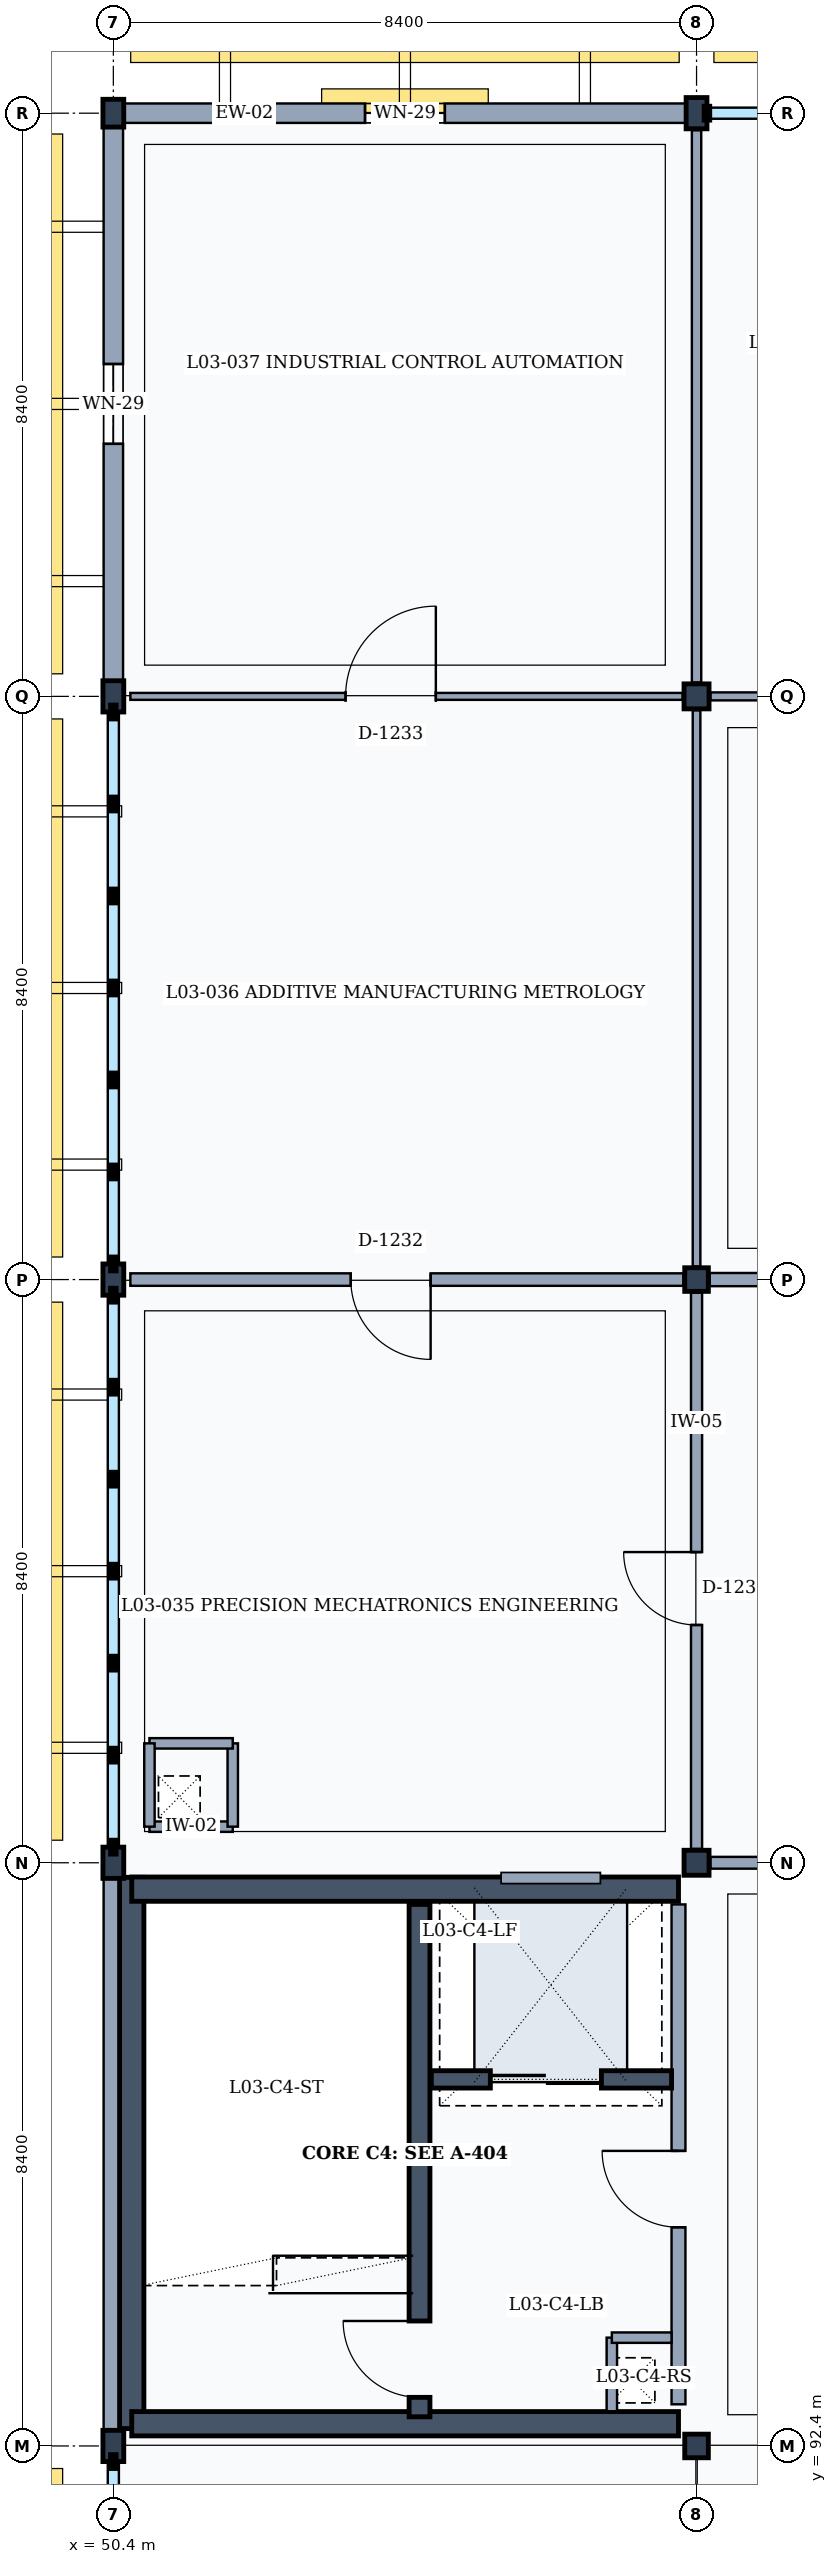
"""IFC4 building model, lengths in metres.
Left out: names, types, materials, properties, quantities, classifications, styles, units other than length and angle.
Written with IfcOpenShell. Run it as: python <this file> out.ifc"""

import sys

from ifc_helpers import new_model, si_unit, direction, frame, frame_2d, origin, origin_2d, place, context, subcontext, project, spatial, rectangle, i_section, extrude, element, fill, save


model = new_model("IFC4")
c1 = context("Model", 3, precision=1e-05, world=origin(), true_north=direction((0.0, 1.0)))
c2 = subcontext(c1, "Body", "Model", "MODEL_VIEW")
j1 = project(units=[si_unit("LENGTHUNIT", "METRE"), si_unit("PLANEANGLEUNIT", "RADIAN")], contexts=[c1])
p1 = place(None, origin())
s1 = spatial("IfcSite", under=j1, at=p1, CompositionType="ELEMENT")
p2 = place(p1, origin())
s2 = spatial("IfcBuilding", under=s1, at=p2, CompositionType="ELEMENT")
p3 = place(p2, frame((0.0, 0.0, 13.8)))
s3 = spatial("IfcBuildingStorey", under=s2, at=p3, CompositionType="ELEMENT", Elevation=13.8)
for number, where, z_axis, x_axis in (
    (1, (50.4, 92.4, 0.0), (0.0, 0.0, 1.0), (1.0, 0.0, 0.0)),
    (2, (50.4, 100.8, 0.0), (0.0, 0.0, 1.0), (1.0, 0.0, 0.0)),
    (3, (50.4, 109.2, 0.0), (0.0, 0.0, 1.0), (1.0, 0.0, 0.0)),
    (4, (50.4, 117.6, 0.0), (0.0, 0.0, 1.0), (1.0, 0.0, 0.0)),
):
    element("IfcColumn", number, at=place(p3, frame(where, z_axis=z_axis, x_axis=x_axis)), inside=s3, PredefinedType="COLUMN", context=c2, shape_type="SweptSolid", body=[
        extrude(i_section(OverallWidth=0.3, OverallDepth=0.45, WebThickness=0.014, FlangeThickness=0.026, FilletRadius=0.027, at=origin_2d()), origin(), (0.0, 0.0, 1.0), 4.2),
    ])
p4 = place(p3, frame((50.4, 126.0, 0.0), z_axis=(0.0, 0.0, 1.0), x_axis=(1.0, 0.0, 0.0)))
e5 = element("IfcColumn", 5, at=p4, inside=s3, PredefinedType="COLUMN", context=c2, shape_type="SweptSolid", body=[
    extrude(i_section(OverallWidth=0.3, OverallDepth=0.4, WebThickness=0.013, FlangeThickness=0.024, FilletRadius=0.027, at=origin_2d()), origin(), (0.0, 0.0, 1.0), 4.2),
])
p5 = place(p3, frame((58.8, 92.4, 0.0), z_axis=(0.0, 0.0, 1.0), x_axis=(1.0, 0.0, 0.0)))
e6 = element("IfcColumn", 6, at=p5, inside=s3, PredefinedType="COLUMN", context=c2, shape_type="SweptSolid", body=[
    extrude(rectangle(XDim=0.34, YDim=0.34, at=origin_2d()), origin(), (0.0, 0.0, 1.0), 4.2),
])
p6 = place(p3, frame((58.8, 100.8, 0.0), z_axis=(0.0, 0.0, 1.0), x_axis=(1.0, 0.0, 0.0)))
e7 = element("IfcColumn", 7, at=p6, inside=s3, PredefinedType="COLUMN", context=c2, shape_type="SweptSolid", body=[
    extrude(rectangle(XDim=0.36, YDim=0.36, at=origin_2d()), origin(), (0.0, 0.0, 1.0), 4.2),
])
p7 = place(p3, frame((58.8, 109.2, 0.0), z_axis=(0.0, 0.0, 1.0), x_axis=(1.0, 0.0, 0.0)))
e8 = element("IfcColumn", 8, at=p7, inside=s3, PredefinedType="COLUMN", context=c2, shape_type="SweptSolid", body=[
    extrude(rectangle(XDim=0.34, YDim=0.34, at=origin_2d()), origin(), (0.0, 0.0, 1.0), 4.2),
])
p8 = place(p3, frame((58.8, 117.6, 0.0), z_axis=(0.0, 0.0, 1.0), x_axis=(1.0, 0.0, 0.0)))
e9 = element("IfcColumn", 9, at=p8, inside=s3, PredefinedType="COLUMN", context=c2, shape_type="SweptSolid", body=[
    extrude(rectangle(XDim=0.36, YDim=0.36, at=origin_2d()), origin(), (0.0, 0.0, 1.0), 4.2),
])
p9 = place(p3, frame((58.8, 126.0, 0.0), z_axis=(0.0, 0.0, 1.0), x_axis=(1.0, 0.0, 0.0)))
e10 = element("IfcColumn", 10, at=p9, inside=s3, PredefinedType="COLUMN", context=c2, shape_type="SweptSolid", body=[
    extrude(i_section(OverallWidth=0.3, OverallDepth=0.45, WebThickness=0.014, FlangeThickness=0.026, FilletRadius=0.027, at=origin_2d()), origin(), (0.0, 0.0, 1.0), 4.2),
])
p10 = place(p3, frame((50.4, 92.625, 0.0), z_axis=(0.0, 0.0, 1.0), x_axis=(0.0, 1.0, 0.0)))
e11 = element("IfcWall", 11, at=p10, inside=s3, PredefinedType="SOLIDWALL", context=c2, shape_type="SweptSolid", body=[
    extrude(rectangle(XDim=7.95, YDim=0.28, at=frame_2d((3.975, 0.0))), origin(), (0.0, 0.0, 1.0), 3.36),
])
p11 = place(p3, frame((50.55, 126.0, 0.0), z_axis=(0.0, 0.0, 1.0), x_axis=(1.0, 0.0, 0.0)))
e12 = element("IfcWall", 12, at=p11, inside=s3, PredefinedType="SOLIDWALL", context=c2, shape_type="SweptSolid", body=[
    extrude(rectangle(XDim=8.1, YDim=0.28, at=frame_2d((4.05, 0.0))), origin(), (0.0, 0.0, 1.0), 3.36),
])
p12 = place(p11, frame((3.475, 0.0, 0.9)))
e13 = element("IfcOpeningElement", 13, at=p12, cuts=e12, PredefinedType="OPENING", context=c2, shape_type="SweptSolid", body=[
    extrude(rectangle(XDim=1.15, YDim=1.65, at=frame_2d((0.575, 0.825))), frame((0.0, 0.15, 0.0), z_axis=(0.0, -1.0, 0.0), x_axis=(1.0, 0.0, 0.0)), (0.0, 0.0, 1.0), 0.3),
])
p13 = place(p3, frame((50.4, 117.825, 0.0), z_axis=(0.0, 0.0, 1.0), x_axis=(0.0, 1.0, 0.0)))
e14 = element("IfcWall", 14, at=p13, inside=s3, PredefinedType="SOLIDWALL", context=c2, shape_type="SweptSolid", body=[
    extrude(rectangle(XDim=7.975, YDim=0.28, at=frame_2d((3.988, 0.0))), origin(), (0.0, 0.0, 1.0), 3.36),
])
p14 = place(p13, frame((3.413, 0.0, 0.9)))
e15 = element("IfcOpeningElement", 15, at=p14, cuts=e14, PredefinedType="OPENING", context=c2, shape_type="SweptSolid", body=[
    extrude(rectangle(XDim=1.15, YDim=1.65, at=frame_2d((0.575, 0.825))), frame((0.0, 0.15, 0.0), z_axis=(0.0, -1.0, 0.0), x_axis=(1.0, 0.0, 0.0)), (0.0, 0.0, 1.0), 0.3),
])
p15 = place(p3, frame((50.665, 92.65, 0.0), z_axis=(0.0, 0.0, 1.0), x_axis=(0.0, 1.0, 0.0)))
e16 = element("IfcWall", 16, at=p15, inside=s3, PredefinedType="SHEAR", context=c2, shape_type="SweptSolid", body=[
    extrude(rectangle(XDim=7.94, YDim=0.35, at=frame_2d((3.97, 0.0))), origin(), (0.0, 0.0, 1.0), 3.98),
])
p16 = place(p3, frame((50.665, 100.42, 0.0), z_axis=(0.0, 0.0, 1.0), x_axis=(1.0, 0.0, 0.0)))
e17 = element("IfcWall", 17, at=p16, inside=s3, PredefinedType="SHEAR", context=c2, shape_type="SweptSolid", body=[
    extrude(rectangle(XDim=7.875, YDim=0.35, at=frame_2d((3.938, 0.0))), origin(), (0.0, 0.0, 1.0), 3.98),
])
p17 = place(p3, frame((58.54, 100.2, 0.0), z_axis=(0.0, 0.0, 1.0), x_axis=(0.0, -1.0, 0.0)))
e18 = element("IfcWall", 18, at=p17, inside=s3, PredefinedType="PARTITIONING", context=c2, shape_type="SweptSolid", body=[
    extrude(rectangle(XDim=7.2, YDim=0.2, at=frame_2d((3.6, 0.0))), origin(), (0.0, 0.0, 1.0), 3.32),
])
p18 = place(p17, frame((3.55, 0.0, 0.0)))
e19 = element("IfcOpeningElement", 19, at=p18, cuts=e18, PredefinedType="OPENING", context=c2, shape_type="SweptSolid", body=[
    extrude(rectangle(XDim=1.1, YDim=2.15, at=frame_2d((0.55, 1.075))), frame((0.0, 0.11, 0.0), z_axis=(0.0, -1.0, 0.0), x_axis=(1.0, 0.0, 0.0)), (0.0, 0.0, 1.0), 0.22),
])
p19 = place(p3, frame((58.54, 92.72, 0.0), z_axis=(0.0, 0.0, 1.0), x_axis=(-1.0, 0.0, 0.0)))
e20 = element("IfcWall", 20, at=p19, inside=s3, PredefinedType="SHEAR", context=c2, shape_type="SweptSolid", body=[
    extrude(rectangle(XDim=7.875, YDim=0.35, at=frame_2d((3.938, 0.0))), origin(), (0.0, 0.0, 1.0), 3.98),
])
p20 = place(p3, frame((54.81, 92.82, 0.0), z_axis=(0.0, 0.0, 1.0), x_axis=(0.0, 1.0, 0.0)))
e21 = element("IfcWall", 21, at=p20, inside=s3, PredefinedType="SHEAR", context=c2, shape_type="SweptSolid", body=[
    extrude(rectangle(XDim=7.38, YDim=0.3, at=frame_2d((3.69, 0.0))), origin(), (0.0, 0.0, 1.0), 3.98),
])
p21 = place(p20, frame((0.28, 0.0, 0.0)))
e22 = element("IfcOpeningElement", 22, at=p21, cuts=e21, PredefinedType="OPENING", context=c2, shape_type="SweptSolid", body=[
    extrude(rectangle(XDim=1.1, YDim=2.15, at=frame_2d((0.55, 1.075))), frame((0.0, 0.16, 0.0), z_axis=(0.0, -1.0, 0.0), x_axis=(1.0, 0.0, 0.0)), (0.0, 0.0, 1.0), 0.32),
])
p22 = place(p3, frame((57.58, 93.96, 0.0), z_axis=(0.0, 0.0, 1.0), x_axis=(0.0, -1.0, 0.0)))
e23 = element("IfcWall", 23, at=p22, inside=s3, PredefinedType="PARTITIONING", context=c2, shape_type="SweptSolid", body=[
    extrude(rectangle(XDim=1.06, YDim=0.15, at=frame_2d((0.53, 0.0))), origin(), (0.0, 0.0, 1.0), 3.32),
])
p23 = place(p3, frame((57.58, 93.96, 0.0), z_axis=(0.0, 0.0, 1.0), x_axis=(1.0, 0.0, 0.0)))
e24 = element("IfcWall", 24, at=p23, inside=s3, PredefinedType="PARTITIONING", context=c2, shape_type="SweptSolid", body=[
    extrude(rectangle(XDim=0.86, YDim=0.15, at=frame_2d((0.43, 0.0))), origin(), (0.0, 0.0, 1.0), 3.32),
])
p24 = place(p3, frame((54.98, 97.68, 0.0), z_axis=(0.0, 0.0, 1.0), x_axis=(1.0, 0.0, 0.0)))
e25 = element("IfcWall", 25, at=p24, inside=s3, PredefinedType="SHEAR", context=c2, shape_type="SweptSolid", body=[
    extrude(rectangle(XDim=3.46, YDim=0.25, at=frame_2d((1.73, 0.0))), origin(), (0.0, 0.0, 1.0), 3.98),
])
p25 = place(p24, frame((0.85, 0.0, 0.0)))
e26 = element("IfcOpeningElement", 26, at=p25, cuts=e25, PredefinedType="OPENING", context=c2, shape_type="SweptSolid", body=[
    extrude(rectangle(XDim=1.6, YDim=2.3, at=frame_2d((0.8, 1.15))), frame((0.0, 0.135, 0.0), z_axis=(0.0, -1.0, 0.0), x_axis=(1.0, 0.0, 0.0)), (0.0, 0.0, 1.0), 0.27),
])
p26 = place(p3, frame((50.92, 101.32, 0.0), z_axis=(0.0, 0.0, 1.0), x_axis=(1.0, 0.0, 0.0)))
e27 = element("IfcWall", 27, at=p26, inside=s3, PredefinedType="PARTITIONING", context=c2, shape_type="SweptSolid", body=[
    extrude(rectangle(XDim=1.2, YDim=0.15, at=frame_2d((0.6, 0.0))), origin(), (0.0, 0.0, 1.0), 3.98),
])
p27 = place(p3, frame((52.12, 101.32, 0.0), z_axis=(0.0, 0.0, 1.0), x_axis=(0.0, 1.0, 0.0)))
e28 = element("IfcWall", 28, at=p27, inside=s3, PredefinedType="PARTITIONING", context=c2, shape_type="SweptSolid", body=[
    extrude(rectangle(XDim=1.2, YDim=0.15, at=frame_2d((0.6, 0.0))), origin(), (0.0, 0.0, 1.0), 3.98),
])
p28 = place(p3, frame((52.12, 102.52, 0.0), z_axis=(0.0, 0.0, 1.0), x_axis=(-1.0, 0.0, 0.0)))
e29 = element("IfcWall", 29, at=p28, inside=s3, PredefinedType="PARTITIONING", context=c2, shape_type="SweptSolid", body=[
    extrude(rectangle(XDim=1.2, YDim=0.15, at=frame_2d((0.6, 0.0))), origin(), (0.0, 0.0, 1.0), 3.98),
])
p29 = place(p3, frame((50.92, 102.52, 0.0), z_axis=(0.0, 0.0, 1.0), x_axis=(0.0, -1.0, 0.0)))
e30 = element("IfcWall", 30, at=p29, inside=s3, PredefinedType="PARTITIONING", context=c2, shape_type="SweptSolid", body=[
    extrude(rectangle(XDim=1.2, YDim=0.15, at=frame_2d((0.6, 0.0))), origin(), (0.0, 0.0, 1.0), 3.98),
])
p30 = place(p3, frame((58.8, 101.0, 0.0), z_axis=(0.0, 0.0, 1.0), x_axis=(0.0, 1.0, 0.0)))
e31 = element("IfcWall", 31, at=p30, inside=s3, PredefinedType="PARTITIONING", context=c2, shape_type="SweptSolid", body=[
    extrude(rectangle(XDim=8.01, YDim=0.16, at=frame_2d((4.005, 0.0))), origin(), (0.0, 0.0, 1.0), 3.32),
])
p31 = place(p30, frame((3.225, 0.0, 0.0)))
e32 = element("IfcOpeningElement", 32, at=p31, cuts=e31, PredefinedType="OPENING", context=c2, shape_type="SweptSolid", body=[
    extrude(rectangle(XDim=1.05, YDim=2.2, at=frame_2d((0.525, 1.1))), frame((0.0, 0.09, 0.0), z_axis=(0.0, -1.0, 0.0), x_axis=(1.0, 0.0, 0.0)), (0.0, 0.0, 1.0), 0.18),
])
p32 = place(p3, frame((50.645, 109.2, 0.0), z_axis=(0.0, 0.0, 1.0), x_axis=(1.0, 0.0, 0.0)))
e33 = element("IfcWall", 33, at=p32, inside=s3, PredefinedType="PARTITIONING", context=c2, shape_type="SweptSolid", body=[
    extrude(rectangle(XDim=7.965, YDim=0.18, at=frame_2d((3.982, 0.0))), origin(), (0.0, 0.0, 1.0), 3.32),
])
p33 = place(p32, frame((3.175, 0.0, 0.0)))
e34 = element("IfcOpeningElement", 34, at=p33, cuts=e33, PredefinedType="OPENING", context=c2, shape_type="SweptSolid", body=[
    extrude(rectangle(XDim=1.15, YDim=2.25, at=frame_2d((0.575, 1.125))), frame((0.0, 0.1, 0.0), z_axis=(0.0, -1.0, 0.0), x_axis=(1.0, 0.0, 0.0)), (0.0, 0.0, 1.0), 0.2),
])
p34 = place(p3, frame((58.8, 109.39, 0.0), z_axis=(0.0, 0.0, 1.0), x_axis=(0.0, 1.0, 0.0)))
e35 = element("IfcWall", 35, at=p34, inside=s3, PredefinedType="PARTITIONING", context=c2, shape_type="SweptSolid", body=[
    extrude(rectangle(XDim=8.01, YDim=0.11, at=frame_2d((4.005, 0.0))), origin(), (0.0, 0.0, 1.0), 3.32),
])
p35 = place(p3, frame((50.645, 117.6, 0.0), z_axis=(0.0, 0.0, 1.0), x_axis=(1.0, 0.0, 0.0)))
e36 = element("IfcWall", 36, at=p35, inside=s3, PredefinedType="MOVABLE", context=c2, shape_type="SweptSolid", body=[
    extrude(rectangle(XDim=7.955, YDim=0.1, at=frame_2d((3.978, 0.0))), origin(), (0.0, 0.0, 1.0), 3.32),
])
p36 = place(p35, frame((3.1, 0.0, 0.0)))
e37 = element("IfcOpeningElement", 37, at=p36, cuts=e36, PredefinedType="OPENING", context=c2, shape_type="SweptSolid", body=[
    extrude(rectangle(XDim=1.3, YDim=2.2, at=frame_2d((0.65, 1.1))), frame((0.0, 0.06, 0.0), z_axis=(0.0, -1.0, 0.0), x_axis=(1.0, 0.0, 0.0)), (0.0, 0.0, 1.0), 0.12),
])
p37 = place(p3, frame((58.8, 117.8, 0.0), z_axis=(0.0, 0.0, 1.0), x_axis=(0.0, 1.0, 0.0)))
e38 = element("IfcWall", 38, at=p37, inside=s3, PredefinedType="PARTITIONING", context=c2, shape_type="SweptSolid", body=[
    extrude(rectangle(XDim=7.955, YDim=0.135, at=frame_2d((3.978, 0.0))), origin(), (0.0, 0.0, 1.0), 3.32),
])
p38 = place(p3, frame((59.0, 100.8, 0.0), z_axis=(0.0, 0.0, 1.0), x_axis=(1.0, 0.0, 0.0)))
e39 = element("IfcWall", 39, at=p38, inside=s3, PredefinedType="PARTITIONING", context=c2, shape_type="SweptSolid", body=[
    extrude(rectangle(XDim=8.055, YDim=0.17, at=frame_2d((4.027, 0.0))), origin(), (0.0, 0.0, 1.0), 3.32),
])
p39 = place(p38, frame((2.975, 0.0, 0.0)))
e40 = element("IfcOpeningElement", 40, at=p39, cuts=e39, PredefinedType="OPENING", context=c2, shape_type="SweptSolid", body=[
    extrude(rectangle(XDim=1.55, YDim=2.35, at=frame_2d((0.775, 1.175))), frame((0.0, 0.095, 0.0), z_axis=(0.0, -1.0, 0.0), x_axis=(1.0, 0.0, 0.0)), (0.0, 0.0, 1.0), 0.19),
])
p40 = place(p3, frame((58.99, 109.2, 0.0), z_axis=(0.0, 0.0, 1.0), x_axis=(1.0, 0.0, 0.0)))
e41 = element("IfcWall", 41, at=p40, inside=s3, PredefinedType="PARTITIONING", context=c2, shape_type="SweptSolid", body=[
    extrude(rectangle(XDim=8.065, YDim=0.19, at=frame_2d((4.032, 0.0))), origin(), (0.0, 0.0, 1.0), 3.32),
])
p41 = place(p40, frame((2.9, 0.0, 0.0)))
e42 = element("IfcOpeningElement", 42, at=p41, cuts=e41, PredefinedType="OPENING", context=c2, shape_type="SweptSolid", body=[
    extrude(rectangle(XDim=1.7, YDim=2.3, at=frame_2d((0.85, 1.15))), frame((0.0, 0.105, 0.0), z_axis=(0.0, -1.0, 0.0), x_axis=(1.0, 0.0, 0.0)), (0.0, 0.0, 1.0), 0.21),
])
p42 = place(p3, frame((59.0, 117.6, 0.0), z_axis=(0.0, 0.0, 1.0), x_axis=(1.0, 0.0, 0.0)))
e43 = element("IfcWall", 43, at=p42, inside=s3, PredefinedType="PARTITIONING", context=c2, shape_type="SweptSolid", body=[
    extrude(rectangle(XDim=8.0, YDim=0.115, at=frame_2d((4.0, 0.0))), origin(), (0.0, 0.0, 1.0), 3.32),
])
p43 = place(p42, frame((2.8, 0.0, 0.0)))
e44 = element("IfcOpeningElement", 44, at=p43, cuts=e43, PredefinedType="OPENING", context=c2, shape_type="SweptSolid", body=[
    extrude(rectangle(XDim=1.9, YDim=2.4, at=frame_2d((0.95, 1.2))), frame((0.0, 0.067, 0.0), z_axis=(0.0, -1.0, 0.0), x_axis=(1.0, 0.0, 0.0)), (0.0, 0.0, 1.0), 0.135),
])
p44 = place(p12, origin())
e45 = element("IfcWindow", 45, at=p44, inside=s3, PartitioningType="SINGLE_PANEL", PredefinedType="WINDOW", context=c2, shape_type="SweptSolid", body=[
    extrude(rectangle(XDim=1.15, YDim=1.65, at=frame_2d((0.575, 0.825))), frame((0.0, 0.03, 0.0), z_axis=(0.0, -1.0, 0.0), x_axis=(1.0, 0.0, 0.0)), (0.0, 0.0, 1.0), 0.06),
])
fill(e13, e45)
p45 = place(p14, origin())
e46 = element("IfcWindow", 46, at=p45, inside=s3, PartitioningType="SINGLE_PANEL", PredefinedType="WINDOW", context=c2, shape_type="SweptSolid", body=[
    extrude(rectangle(XDim=1.15, YDim=1.65, at=frame_2d((0.575, 0.825))), frame((0.0, 0.03, 0.0), z_axis=(0.0, -1.0, 0.0), x_axis=(1.0, 0.0, 0.0)), (0.0, 0.0, 1.0), 0.06),
])
fill(e15, e46)
p46 = place(p18, frame((1.1, 0.0, 0.0), z_axis=(0.0, 0.0, 1.0), x_axis=(-1.0, 0.0, 0.0)))
e47 = element("IfcDoor", 47, at=p46, inside=s3, OperationType="SINGLE_SWING_RIGHT", PredefinedType="DOOR", context=c2, shape_type="SweptSolid", body=[
    extrude(rectangle(XDim=1.1, YDim=2.15, at=frame_2d((0.55, 1.075))), frame((0.0, 0.025, 0.0), z_axis=(0.0, -1.0, 0.0), x_axis=(1.0, 0.0, 0.0)), (0.0, 0.0, 1.0), 0.05),
])
fill(e19, e47)
p47 = place(p21, origin())
e48 = element("IfcDoor", 48, at=p47, inside=s3, OperationType="SINGLE_SWING_RIGHT", PredefinedType="DOOR", context=c2, shape_type="SweptSolid", body=[
    extrude(rectangle(XDim=1.1, YDim=2.15, at=frame_2d((0.55, 1.075))), frame((0.0, 0.025, 0.0), z_axis=(0.0, -1.0, 0.0), x_axis=(1.0, 0.0, 0.0)), (0.0, 0.0, 1.0), 0.05),
])
fill(e22, e48)
p48 = place(p25, origin())
e49 = element("IfcDoor", 49, at=p48, inside=s3, OperationType="DOUBLE_DOOR_SLIDING", PredefinedType="DOOR", context=c2, shape_type="SweptSolid", body=[
    extrude(rectangle(XDim=1.6, YDim=2.3, at=frame_2d((0.8, 1.15))), frame((0.0, 0.025, 0.0), z_axis=(0.0, -1.0, 0.0), x_axis=(1.0, 0.0, 0.0)), (0.0, 0.0, 1.0), 0.05),
])
fill(e26, e49)
p49 = place(p31, origin())
e50 = element("IfcDoor", 50, at=p49, inside=s3, OperationType="SINGLE_SWING_RIGHT", PredefinedType="DOOR", context=c2, shape_type="SweptSolid", body=[
    extrude(rectangle(XDim=1.05, YDim=2.2, at=frame_2d((0.525, 1.1))), frame((0.0, 0.025, 0.0), z_axis=(0.0, -1.0, 0.0), x_axis=(1.0, 0.0, 0.0)), (0.0, 0.0, 1.0), 0.05),
])
fill(e32, e50)
p50 = place(p33, frame((1.15, 0.0, 0.0), z_axis=(0.0, 0.0, 1.0), x_axis=(-1.0, 0.0, 0.0)))
e51 = element("IfcDoor", 51, at=p50, inside=s3, OperationType="SINGLE_SWING_LEFT", PredefinedType="DOOR", context=c2, shape_type="SweptSolid", body=[
    extrude(rectangle(XDim=1.15, YDim=2.25, at=frame_2d((0.575, 1.125))), frame((0.0, 0.025, 0.0), z_axis=(0.0, -1.0, 0.0), x_axis=(1.0, 0.0, 0.0)), (0.0, 0.0, 1.0), 0.05),
])
fill(e34, e51)
p51 = place(p36, origin())
e52 = element("IfcDoor", 52, at=p51, inside=s3, OperationType="SINGLE_SWING_RIGHT", PredefinedType="DOOR", context=c2, shape_type="SweptSolid", body=[
    extrude(rectangle(XDim=1.3, YDim=2.2, at=frame_2d((0.65, 1.1))), frame((0.0, 0.025, 0.0), z_axis=(0.0, -1.0, 0.0), x_axis=(1.0, 0.0, 0.0)), (0.0, 0.0, 1.0), 0.05),
])
fill(e37, e52)
save(model, sys.argv[1])
